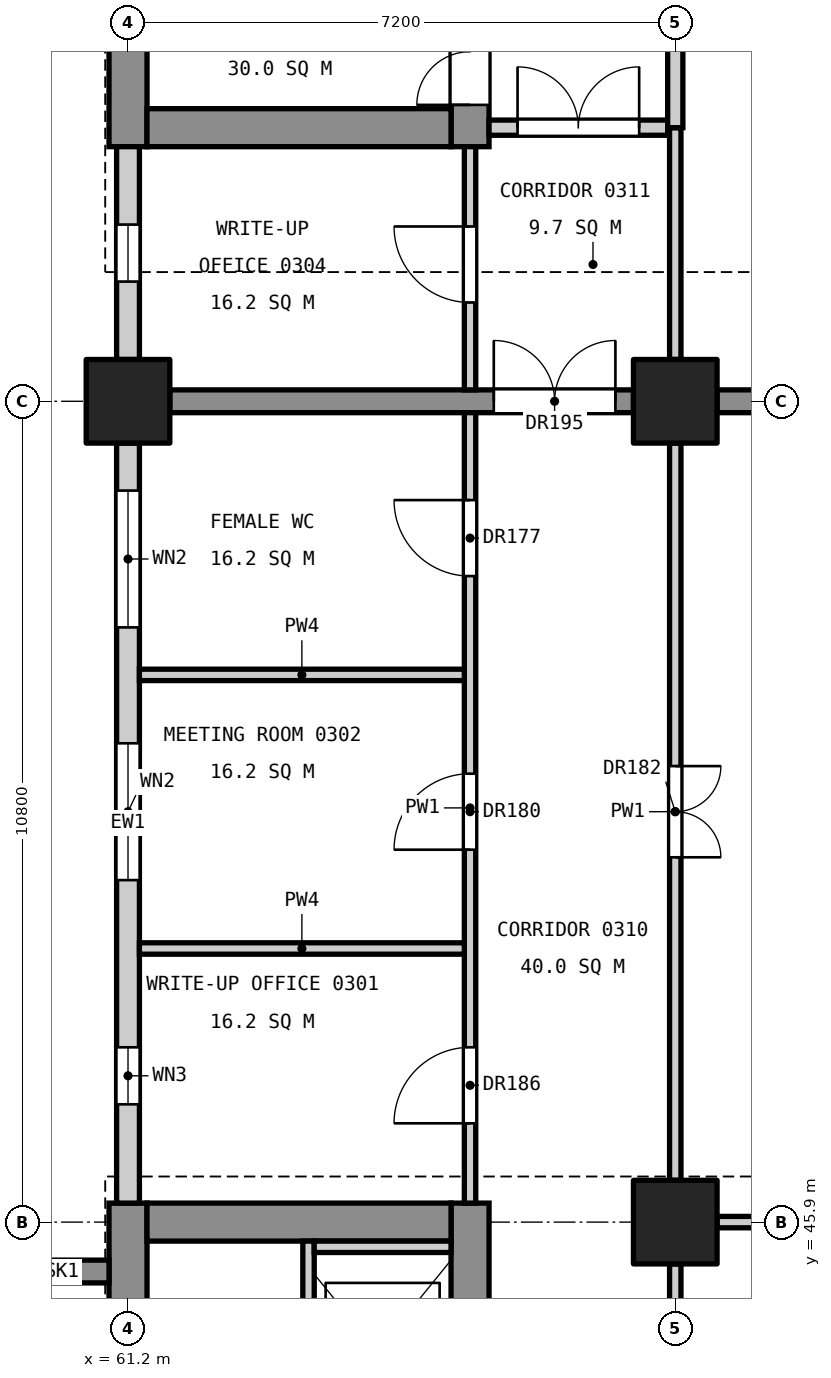
"""IFC4 building model, lengths in metres.
Left out: names, types, materials, properties, quantities, classifications, styles, units other than length and angle.
Written with IfcOpenShell. Run it as: python <this file> out.ifc"""

import sys

from ifc_helpers import new_model, si_unit, direction, frame, frame_2d, origin, origin_2d, place, context, subcontext, project, spatial, rectangle, extrude, element, fill, save


model = new_model("IFC4")
c1 = context("Model", 3, precision=1e-05, world=origin(), true_north=direction((0.0, 1.0)))
c2 = subcontext(c1, "Body", "Model", "MODEL_VIEW")
j1 = project(units=[si_unit("LENGTHUNIT", "METRE"), si_unit("PLANEANGLEUNIT", "RADIAN")], contexts=[c1])
p1 = place(None, origin())
s1 = spatial("IfcSite", under=j1, at=p1, CompositionType="ELEMENT")
p2 = place(p1, origin())
s2 = spatial("IfcBuilding", under=s1, at=p2, CompositionType="ELEMENT")
p3 = place(p2, frame((0.0, 0.0, 16.8)))
s3 = spatial("IfcBuildingStorey", under=s2, at=p3, CompositionType="ELEMENT", Elevation=16.8)
for number, where, z_axis, x_axis in (
    (1, (61.2, 56.7, 0.0), (0.0, 0.0, 1.0), (1.0, 0.0, 0.0)),
    (2, (68.4, 45.9, 0.0), (0.0, 0.0, 1.0), (1.0, 0.0, 0.0)),
    (3, (68.4, 56.7, 0.0), (0.0, 0.0, 1.0), (1.0, 0.0, 0.0)),
):
    element("IfcColumn", number, at=place(p3, frame(where, z_axis=z_axis, x_axis=x_axis)), inside=s3, PredefinedType="COLUMN", context=c2, shape_type="SweptSolid", body=[
        extrude(rectangle(XDim=1.1, YDim=1.1, at=origin_2d()), origin(), (0.0, 0.0, 1.0), 5.4),
    ])
p4 = place(p3, frame((61.2, 34.85, 0.0), z_axis=(0.0, 0.0, 1.0), x_axis=(0.0, 1.0, 0.0)))
e4 = element("IfcWall", 4, at=p4, inside=s3, PredefinedType="SHEAR", context=c2, shape_type="SweptSolid", body=[
    extrude(rectangle(XDim=11.3, YDim=0.5, at=frame_2d((5.65, 0.0))), origin(), (0.0, 0.0, 1.0), 5.15),
])
p5 = place(p4, frame((6.3, 0.0, 3.4)))
e5 = element("IfcOpeningElement", 5, at=p5, cuts=e4, PredefinedType="OPENING", context=c2, shape_type="SweptSolid", body=[
    extrude(rectangle(XDim=1.2, YDim=0.9, at=frame_2d((0.6, 0.45))), frame((0.0, 0.26, 0.0), z_axis=(0.0, -1.0, 0.0), x_axis=(1.0, 0.0, 0.0)), (0.0, 0.0, 1.0), 0.52),
])
p6 = place(p3, frame((65.7, 34.85, 0.0), z_axis=(0.0, 0.0, 1.0), x_axis=(0.0, 1.0, 0.0)))
e6 = element("IfcWall", 6, at=p6, inside=s3, PredefinedType="SHEAR", context=c2, shape_type="SweptSolid", body=[
    extrude(rectangle(XDim=11.3, YDim=0.5, at=frame_2d((5.65, 0.0))), origin(), (0.0, 0.0, 1.0), 5.15),
])
p7 = place(p6, frame((0.55, 0.0, 0.0)))
e7 = element("IfcOpeningElement", 7, at=p7, cuts=e6, PredefinedType="OPENING", context=c2, shape_type="SweptSolid", body=[
    extrude(rectangle(XDim=1.4, YDim=2.1, at=frame_2d((0.7, 1.05))), frame((0.0, 0.26, 0.0), z_axis=(0.0, -1.0, 0.0), x_axis=(1.0, 0.0, 0.0)), (0.0, 0.0, 1.0), 0.52),
])
p8 = place(p6, frame((8.8, 0.0, 0.0)))
e8 = element("IfcOpeningElement", 8, at=p8, cuts=e6, PredefinedType="OPENING", context=c2, shape_type="SweptSolid", body=[
    extrude(rectangle(XDim=1.1, YDim=2.1, at=frame_2d((0.55, 1.05))), frame((0.0, 0.26, 0.0), z_axis=(0.0, -1.0, 0.0), x_axis=(1.0, 0.0, 0.0)), (0.0, 0.0, 1.0), 0.52),
])
p9 = place(p3, frame((61.45, 45.9, 0.0), z_axis=(0.0, 0.0, 1.0), x_axis=(1.0, 0.0, 0.0)))
e9 = element("IfcWall", 9, at=p9, inside=s3, PredefinedType="SHEAR", context=c2, shape_type="SweptSolid", body=[
    extrude(rectangle(XDim=4.0, YDim=0.5, at=frame_2d((2.0, 0.0))), origin(), (0.0, 0.0, 1.0), 5.15),
])
p10 = place(p3, frame((61.2, 60.05, 0.0), z_axis=(0.0, 0.0, 1.0), x_axis=(0.0, 1.0, 0.0)))
e10 = element("IfcWall", 10, at=p10, inside=s3, PredefinedType="SHEAR", context=c2, shape_type="SweptSolid", body=[
    extrude(rectangle(XDim=14.9, YDim=0.5, at=frame_2d((7.45, 0.0))), origin(), (0.0, 0.0, 1.0), 5.15),
])
p11 = place(p10, frame((6.3, 0.0, 3.4)))
e11 = element("IfcOpeningElement", 11, at=p11, cuts=e10, PredefinedType="OPENING", context=c2, shape_type="SweptSolid", body=[
    extrude(rectangle(XDim=1.2, YDim=0.9, at=frame_2d((0.6, 0.45))), frame((0.0, 0.26, 0.0), z_axis=(0.0, -1.0, 0.0), x_axis=(1.0, 0.0, 0.0)), (0.0, 0.0, 1.0), 0.52),
])
p12 = place(p3, frame((65.7, 60.05, 0.0), z_axis=(0.0, 0.0, 1.0), x_axis=(0.0, 1.0, 0.0)))
e12 = element("IfcWall", 12, at=p12, inside=s3, PredefinedType="SHEAR", context=c2, shape_type="SweptSolid", body=[
    extrude(rectangle(XDim=14.9, YDim=0.5, at=frame_2d((7.45, 0.0))), origin(), (0.0, 0.0, 1.0), 5.15),
])
p13 = place(p12, frame((0.55, 0.0, 0.0)))
e13 = element("IfcOpeningElement", 13, at=p13, cuts=e12, PredefinedType="OPENING", context=c2, shape_type="SweptSolid", body=[
    extrude(rectangle(XDim=1.4, YDim=2.1, at=frame_2d((0.7, 1.05))), frame((0.0, 0.26, 0.0), z_axis=(0.0, -1.0, 0.0), x_axis=(1.0, 0.0, 0.0)), (0.0, 0.0, 1.0), 0.52),
])
p14 = place(p12, frame((8.85, 0.0, 0.0)))
e14 = element("IfcOpeningElement", 14, at=p14, cuts=e12, PredefinedType="OPENING", context=c2, shape_type="SweptSolid", body=[
    extrude(rectangle(XDim=1.1, YDim=2.1, at=frame_2d((0.55, 1.05))), frame((0.0, 0.26, 0.0), z_axis=(0.0, -1.0, 0.0), x_axis=(1.0, 0.0, 0.0)), (0.0, 0.0, 1.0), 0.52),
])
p15 = place(p12, frame((11.4, 0.0, 0.0)))
e15 = element("IfcOpeningElement", 15, at=p15, cuts=e12, PredefinedType="OPENING", context=c2, shape_type="SweptSolid", body=[
    extrude(rectangle(XDim=1.1, YDim=2.1, at=frame_2d((0.55, 1.05))), frame((0.0, 0.26, 0.0), z_axis=(0.0, -1.0, 0.0), x_axis=(1.0, 0.0, 0.0)), (0.0, 0.0, 1.0), 0.52),
])
p16 = place(p3, frame((61.45, 60.3, 0.0), z_axis=(0.0, 0.0, 1.0), x_axis=(1.0, 0.0, 0.0)))
e16 = element("IfcWall", 16, at=p16, inside=s3, PredefinedType="SHEAR", context=c2, shape_type="SweptSolid", body=[
    extrude(rectangle(XDim=4.0, YDim=0.5, at=frame_2d((2.0, 0.0))), origin(), (0.0, 0.0, 1.0), 5.15),
])
p17 = place(p3, frame((60.95, 45.25, 0.0), z_axis=(0.0, 0.0, 1.0), x_axis=(-1.0, 0.0, 0.0)))
e17 = element("IfcWall", 17, at=p17, inside=s3, PredefinedType="SHEAR", context=c2, shape_type="SweptSolid", body=[
    extrude(rectangle(XDim=1.25, YDim=0.3, at=frame_2d((0.625, 0.0))), origin(), (0.0, 0.0, 1.0), 5.4),
])
p18 = place(p3, frame((61.75, 56.7, 0.0), z_axis=(0.0, 0.0, 1.0), x_axis=(1.0, 0.0, 0.0)))
e18 = element("IfcWall", 18, at=p18, inside=s3, PredefinedType="SHEAR", context=c2, shape_type="SweptSolid", body=[
    extrude(rectangle(XDim=6.1, YDim=0.3, at=frame_2d((3.05, 0.0))), origin(), (0.0, 0.0, 1.0), 5.15),
])
p19 = place(p18, frame((4.262, 0.0, 0.0)))
e19 = element("IfcOpeningElement", 19, at=p19, cuts=e18, PredefinedType="OPENING", context=c2, shape_type="SweptSolid", body=[
    extrude(rectangle(XDim=1.6, YDim=2.1, at=frame_2d((0.8, 1.05))), frame((0.0, 0.16, 0.0), z_axis=(0.0, -1.0, 0.0), x_axis=(1.0, 0.0, 0.0)), (0.0, 0.0, 1.0), 0.32),
])
p20 = place(p3, frame((68.95, 56.7, 0.0), z_axis=(0.0, 0.0, 1.0), x_axis=(1.0, 0.0, 0.0)))
e20 = element("IfcWall", 20, at=p20, inside=s3, PredefinedType="SHEAR", context=c2, shape_type="SweptSolid", body=[
    extrude(rectangle(XDim=9.7, YDim=0.3, at=frame_2d((4.85, 0.0))), origin(), (0.0, 0.0, 1.0), 5.15),
])
p21 = place(p3, frame((63.575, 43.0, 0.0), z_axis=(0.0, 0.0, 1.0), x_axis=(0.0, 1.0, 0.0)))
e21 = element("IfcWall", 21, at=p21, inside=s3, PredefinedType="SOLIDWALL", context=c2, shape_type="SweptSolid", body=[
    extrude(rectangle(XDim=2.65, YDim=0.15, at=frame_2d((1.325, 0.0))), origin(), (0.0, 0.0, 1.0), 5.4),
])
p22 = place(p3, frame((63.65, 45.575, 0.0), z_axis=(0.0, 0.0, 1.0), x_axis=(1.0, 0.0, 0.0)))
e22 = element("IfcWall", 22, at=p22, inside=s3, PredefinedType="SOLIDWALL", context=c2, shape_type="SweptSolid", body=[
    extrude(rectangle(XDim=1.8, YDim=0.15, at=frame_2d((0.9, 0.0))), origin(), (0.0, 0.0, 1.0), 5.4),
])
p23 = place(p3, frame((61.2, 46.15, 0.0), z_axis=(0.0, 0.0, 1.0), x_axis=(0.0, 1.0, 0.0)))
e23 = element("IfcWall", 23, at=p23, inside=s3, PredefinedType="STANDARD", context=c2, shape_type="SweptSolid", body=[
    extrude(rectangle(XDim=10.0, YDim=0.3, at=frame_2d((5.0, 0.0))), origin(), (0.0, 0.0, 1.0), 4.25),
])
p24 = place(p23, frame((1.3, 0.0, 0.8)))
e24 = element("IfcOpeningElement", 24, at=p24, cuts=e23, PredefinedType="OPENING", context=c2, shape_type="SweptSolid", body=[
    extrude(rectangle(XDim=0.75, YDim=1.2, at=frame_2d((0.375, 0.6))), frame((0.0, 0.16, 0.0), z_axis=(0.0, -1.0, 0.0), x_axis=(1.0, 0.0, 0.0)), (0.0, 0.0, 1.0), 0.32),
])
p25 = place(p23, frame((4.25, 0.0, 0.9)))
e25 = element("IfcOpeningElement", 25, at=p25, cuts=e23, PredefinedType="OPENING", context=c2, shape_type="SweptSolid", body=[
    extrude(rectangle(XDim=1.8, YDim=3.0, at=frame_2d((0.9, 1.5))), frame((0.0, 0.16, 0.0), z_axis=(0.0, -1.0, 0.0), x_axis=(1.0, 0.0, 0.0)), (0.0, 0.0, 1.0), 0.32),
])
p26 = place(p23, frame((7.575, 0.0, 0.9)))
e26 = element("IfcOpeningElement", 26, at=p26, cuts=e23, PredefinedType="OPENING", context=c2, shape_type="SweptSolid", body=[
    extrude(rectangle(XDim=1.8, YDim=3.0, at=frame_2d((0.9, 1.5))), frame((0.0, 0.16, 0.0), z_axis=(0.0, -1.0, 0.0), x_axis=(1.0, 0.0, 0.0)), (0.0, 0.0, 1.0), 0.32),
])
p27 = place(p3, frame((61.2, 57.25, 0.0), z_axis=(0.0, 0.0, 1.0), x_axis=(0.0, 1.0, 0.0)))
e27 = element("IfcWall", 27, at=p27, inside=s3, PredefinedType="STANDARD", context=c2, shape_type="SweptSolid", body=[
    extrude(rectangle(XDim=2.8, YDim=0.3, at=frame_2d((1.4, 0.0))), origin(), (0.0, 0.0, 1.0), 4.25),
])
p28 = place(p27, frame((1.025, 0.0, 0.8)))
e28 = element("IfcOpeningElement", 28, at=p28, cuts=e27, PredefinedType="OPENING", context=c2, shape_type="SweptSolid", body=[
    extrude(rectangle(XDim=0.75, YDim=1.2, at=frame_2d((0.375, 0.6))), frame((0.0, 0.16, 0.0), z_axis=(0.0, -1.0, 0.0), x_axis=(1.0, 0.0, 0.0)), (0.0, 0.0, 1.0), 0.32),
])
p29 = place(p3, frame((65.7, 46.15, 0.0), z_axis=(0.0, 0.0, 1.0), x_axis=(0.0, 1.0, 0.0)))
e29 = element("IfcWall", 29, at=p29, inside=s3, PredefinedType="PARTITIONING", context=c2, shape_type="SweptSolid", body=[
    extrude(rectangle(XDim=10.4, YDim=0.15, at=frame_2d((5.2, 0.0))), origin(), (0.0, 0.0, 1.0), 4.05),
])
p30 = place(p29, frame((8.25, 0.0, 0.0)))
e30 = element("IfcOpeningElement", 30, at=p30, cuts=e29, PredefinedType="OPENING", context=c2, shape_type="SweptSolid", body=[
    extrude(rectangle(XDim=1.0, YDim=2.1, at=frame_2d((0.5, 1.05))), frame((0.0, 0.085, 0.0), z_axis=(0.0, -1.0, 0.0), x_axis=(1.0, 0.0, 0.0)), (0.0, 0.0, 1.0), 0.17),
])
p31 = place(p29, frame((4.65, 0.0, 0.0)))
e31 = element("IfcOpeningElement", 31, at=p31, cuts=e29, PredefinedType="OPENING", context=c2, shape_type="SweptSolid", body=[
    extrude(rectangle(XDim=1.0, YDim=2.1, at=frame_2d((0.5, 1.05))), frame((0.0, 0.085, 0.0), z_axis=(0.0, -1.0, 0.0), x_axis=(1.0, 0.0, 0.0)), (0.0, 0.0, 1.0), 0.17),
])
p32 = place(p29, frame((1.05, 0.0, 0.0)))
e32 = element("IfcOpeningElement", 32, at=p32, cuts=e29, PredefinedType="OPENING", context=c2, shape_type="SweptSolid", body=[
    extrude(rectangle(XDim=1.0, YDim=2.1, at=frame_2d((0.5, 1.05))), frame((0.0, 0.085, 0.0), z_axis=(0.0, -1.0, 0.0), x_axis=(1.0, 0.0, 0.0)), (0.0, 0.0, 1.0), 0.17),
])
p33 = place(p3, frame((65.7, 56.85, 0.0), z_axis=(0.0, 0.0, 1.0), x_axis=(0.0, 1.0, 0.0)))
e33 = element("IfcWall", 33, at=p33, inside=s3, PredefinedType="PARTITIONING", context=c2, shape_type="SweptSolid", body=[
    extrude(rectangle(XDim=3.2, YDim=0.15, at=frame_2d((1.6, 0.0))), origin(), (0.0, 0.0, 1.0), 4.05),
])
p34 = place(p33, frame((1.15, 0.0, 0.0)))
e34 = element("IfcOpeningElement", 34, at=p34, cuts=e33, PredefinedType="OPENING", context=c2, shape_type="SweptSolid", body=[
    extrude(rectangle(XDim=1.0, YDim=2.1, at=frame_2d((0.5, 1.05))), frame((0.0, 0.085, 0.0), z_axis=(0.0, -1.0, 0.0), x_axis=(1.0, 0.0, 0.0)), (0.0, 0.0, 1.0), 0.17),
])
for number, where, z_axis, x_axis in (
    (35, (61.35, 49.5, 0.0), (0.0, 0.0, 1.0), (1.0, 0.0, 0.0)),
    (36, (61.35, 53.1, 0.0), (0.0, 0.0, 1.0), (1.0, 0.0, 0.0)),
):
    element("IfcWall", number, at=place(p3, frame(where, z_axis=z_axis, x_axis=x_axis)), inside=s3, PredefinedType="PARTITIONING", context=c2, shape_type="SweptSolid", body=[
        extrude(rectangle(XDim=4.275, YDim=0.15, at=frame_2d((2.137, 0.0))), origin(), (0.0, 0.0, 1.0), 4.05),
    ])
p35 = place(p3, frame((65.95, 60.3, 0.0), z_axis=(0.0, 0.0, 1.0), x_axis=(1.0, 0.0, 0.0)))
e37 = element("IfcWall", 37, at=p35, inside=s3, PredefinedType="PARTITIONING", context=c2, shape_type="SweptSolid", body=[
    extrude(rectangle(XDim=2.35, YDim=0.2, at=frame_2d((1.175, 0.0))), origin(), (0.0, 0.0, 1.0), 4.05),
])
p36 = place(p35, frame((0.375, 0.0, 0.0)))
e38 = element("IfcOpeningElement", 38, at=p36, cuts=e37, PredefinedType="OPENING", context=c2, shape_type="SweptSolid", body=[
    extrude(rectangle(XDim=1.6, YDim=2.1, at=frame_2d((0.8, 1.05))), frame((0.0, 0.11, 0.0), z_axis=(0.0, -1.0, 0.0), x_axis=(1.0, 0.0, 0.0)), (0.0, 0.0, 1.0), 0.22),
])
p37 = place(p3, frame((68.4, 41.9, 0.0), z_axis=(0.0, 0.0, 1.0), x_axis=(0.0, 1.0, 0.0)))
e39 = element("IfcWall", 39, at=p37, inside=s3, PredefinedType="PARTITIONING", context=c2, shape_type="SweptSolid", body=[
    extrude(rectangle(XDim=3.45, YDim=0.15, at=frame_2d((1.725, 0.0))), origin(), (0.0, 0.0, 1.0), 4.15),
])
p38 = place(p37, frame((1.125, 0.0, 0.0)))
e40 = element("IfcOpeningElement", 40, at=p38, cuts=e39, PredefinedType="OPENING", context=c2, shape_type="SweptSolid", body=[
    extrude(rectangle(XDim=1.2, YDim=2.1, at=frame_2d((0.6, 1.05))), frame((0.0, 0.085, 0.0), z_axis=(0.0, -1.0, 0.0), x_axis=(1.0, 0.0, 0.0)), (0.0, 0.0, 1.0), 0.17),
])
p39 = place(p3, frame((68.4, 46.45, 0.0), z_axis=(0.0, 0.0, 1.0), x_axis=(0.0, 1.0, 0.0)))
e41 = element("IfcWall", 41, at=p39, inside=s3, PredefinedType="PARTITIONING", context=c2, shape_type="SweptSolid", body=[
    extrude(rectangle(XDim=9.7, YDim=0.15, at=frame_2d((4.85, 0.0))), origin(), (0.0, 0.0, 1.0), 4.15),
])
p40 = place(p39, frame((4.25, 0.0, 0.0)))
e42 = element("IfcOpeningElement", 42, at=p40, cuts=e41, PredefinedType="OPENING", context=c2, shape_type="SweptSolid", body=[
    extrude(rectangle(XDim=1.2, YDim=2.1, at=frame_2d((0.6, 1.05))), frame((0.0, 0.085, 0.0), z_axis=(0.0, -1.0, 0.0), x_axis=(1.0, 0.0, 0.0)), (0.0, 0.0, 1.0), 0.17),
])
p41 = place(p3, frame((68.4, 57.25, 0.0), z_axis=(0.0, 0.0, 1.0), x_axis=(0.0, 1.0, 0.0)))
e43 = element("IfcWall", 43, at=p41, inside=s3, PredefinedType="PARTITIONING", context=c2, shape_type="SweptSolid", body=[
    extrude(rectangle(XDim=3.05, YDim=0.15, at=frame_2d((1.525, 0.0))), origin(), (0.0, 0.0, 1.0), 4.15),
])
p42 = place(p3, frame((68.4, 60.3, 0.0), z_axis=(0.0, 0.0, 1.0), x_axis=(0.0, 1.0, 0.0)))
e44 = element("IfcWall", 44, at=p42, inside=s3, PredefinedType="PARTITIONING", context=c2, shape_type="SweptSolid", body=[
    extrude(rectangle(XDim=4.2, YDim=0.2, at=frame_2d((2.1, 0.0))), origin(), (0.0, 0.0, 1.0), 4.15),
])
p43 = place(p3, frame((68.95, 45.9, 0.0), z_axis=(0.0, 0.0, 1.0), x_axis=(1.0, 0.0, 0.0)))
e45 = element("IfcWall", 45, at=p43, inside=s3, PredefinedType="PARTITIONING", context=c2, shape_type="SweptSolid", body=[
    extrude(rectangle(XDim=9.7, YDim=0.15, at=frame_2d((4.85, 0.0))), origin(), (0.0, 0.0, 1.0), 4.05),
])
p44 = place(p13, origin())
e46 = element("IfcDoor", 46, at=p44, inside=s3, OperationType="DOUBLE_DOOR_SINGLE_SWING", PredefinedType="DOOR", context=c2, shape_type="SweptSolid", body=[
    extrude(rectangle(XDim=1.4, YDim=2.1, at=frame_2d((0.7, 1.05))), frame((0.0, 0.025, 0.0), z_axis=(0.0, -1.0, 0.0), x_axis=(1.0, 0.0, 0.0)), (0.0, 0.0, 1.0), 0.05),
])
fill(e13, e46)
p45 = place(p24, origin())
e47 = element("IfcWindow", 47, at=p45, inside=s3, PartitioningType="SINGLE_PANEL", PredefinedType="WINDOW", context=c2, shape_type="SweptSolid", body=[
    extrude(rectangle(XDim=0.75, YDim=1.2, at=frame_2d((0.375, 0.6))), frame((0.0, 0.03, 0.0), z_axis=(0.0, -1.0, 0.0), x_axis=(1.0, 0.0, 0.0)), (0.0, 0.0, 1.0), 0.06),
])
fill(e24, e47)
p46 = place(p25, origin())
e48 = element("IfcWindow", 48, at=p46, inside=s3, PartitioningType="SINGLE_PANEL", PredefinedType="WINDOW", context=c2, shape_type="SweptSolid", body=[
    extrude(rectangle(XDim=1.8, YDim=3.0, at=frame_2d((0.9, 1.5))), frame((0.0, 0.03, 0.0), z_axis=(0.0, -1.0, 0.0), x_axis=(1.0, 0.0, 0.0)), (0.0, 0.0, 1.0), 0.06),
])
fill(e25, e48)
p47 = place(p26, origin())
e49 = element("IfcWindow", 49, at=p47, inside=s3, PartitioningType="SINGLE_PANEL", PredefinedType="WINDOW", context=c2, shape_type="SweptSolid", body=[
    extrude(rectangle(XDim=1.8, YDim=3.0, at=frame_2d((0.9, 1.5))), frame((0.0, 0.03, 0.0), z_axis=(0.0, -1.0, 0.0), x_axis=(1.0, 0.0, 0.0)), (0.0, 0.0, 1.0), 0.06),
])
fill(e26, e49)
p48 = place(p28, origin())
e50 = element("IfcWindow", 50, at=p48, inside=s3, PartitioningType="SINGLE_PANEL", PredefinedType="WINDOW", context=c2, shape_type="SweptSolid", body=[
    extrude(rectangle(XDim=0.75, YDim=1.2, at=frame_2d((0.375, 0.6))), frame((0.0, 0.03, 0.0), z_axis=(0.0, -1.0, 0.0), x_axis=(1.0, 0.0, 0.0)), (0.0, 0.0, 1.0), 0.06),
])
fill(e28, e50)
p49 = place(p30, origin())
e51 = element("IfcDoor", 51, at=p49, inside=s3, OperationType="SINGLE_SWING_RIGHT", PredefinedType="DOOR", context=c2, shape_type="SweptSolid", body=[
    extrude(rectangle(XDim=1.0, YDim=2.1, at=frame_2d((0.5, 1.05))), frame((0.0, 0.025, 0.0), z_axis=(0.0, -1.0, 0.0), x_axis=(1.0, 0.0, 0.0)), (0.0, 0.0, 1.0), 0.05),
])
fill(e30, e51)
p50 = place(p31, origin())
e52 = element("IfcDoor", 52, at=p50, inside=s3, OperationType="SINGLE_SWING_LEFT", PredefinedType="DOOR", context=c2, shape_type="SweptSolid", body=[
    extrude(rectangle(XDim=1.0, YDim=2.1, at=frame_2d((0.5, 1.05))), frame((0.0, 0.025, 0.0), z_axis=(0.0, -1.0, 0.0), x_axis=(1.0, 0.0, 0.0)), (0.0, 0.0, 1.0), 0.05),
])
fill(e31, e52)
p51 = place(p40, frame((1.2, 0.0, 0.0), z_axis=(0.0, 0.0, 1.0), x_axis=(-1.0, 0.0, 0.0)))
e53 = element("IfcDoor", 53, at=p51, inside=s3, OperationType="DOUBLE_DOOR_SINGLE_SWING", PredefinedType="DOOR", context=c2, shape_type="SweptSolid", body=[
    extrude(rectangle(XDim=1.2, YDim=2.1, at=frame_2d((0.6, 1.05))), frame((0.0, 0.025, 0.0), z_axis=(0.0, -1.0, 0.0), x_axis=(1.0, 0.0, 0.0)), (0.0, 0.0, 1.0), 0.05),
])
fill(e42, e53)
p52 = place(p32, origin())
e54 = element("IfcDoor", 54, at=p52, inside=s3, OperationType="SINGLE_SWING_LEFT", PredefinedType="DOOR", context=c2, shape_type="SweptSolid", body=[
    extrude(rectangle(XDim=1.0, YDim=2.1, at=frame_2d((0.5, 1.05))), frame((0.0, 0.025, 0.0), z_axis=(0.0, -1.0, 0.0), x_axis=(1.0, 0.0, 0.0)), (0.0, 0.0, 1.0), 0.05),
])
fill(e32, e54)
p53 = place(p34, origin())
e55 = element("IfcDoor", 55, at=p53, inside=s3, OperationType="SINGLE_SWING_RIGHT", PredefinedType="DOOR", context=c2, shape_type="SweptSolid", body=[
    extrude(rectangle(XDim=1.0, YDim=2.1, at=frame_2d((0.5, 1.05))), frame((0.0, 0.025, 0.0), z_axis=(0.0, -1.0, 0.0), x_axis=(1.0, 0.0, 0.0)), (0.0, 0.0, 1.0), 0.05),
])
fill(e34, e55)
p54 = place(p36, origin())
e56 = element("IfcDoor", 56, at=p54, inside=s3, OperationType="DOUBLE_DOOR_SINGLE_SWING", PredefinedType="DOOR", context=c2, shape_type="SweptSolid", body=[
    extrude(rectangle(XDim=1.6, YDim=2.1, at=frame_2d((0.8, 1.05))), frame((0.0, 0.025, 0.0), z_axis=(0.0, -1.0, 0.0), x_axis=(1.0, 0.0, 0.0)), (0.0, 0.0, 1.0), 0.05),
])
fill(e38, e56)
p55 = place(p19, origin())
e57 = element("IfcDoor", 57, at=p55, inside=s3, OperationType="DOUBLE_DOOR_SINGLE_SWING", PredefinedType="DOOR", context=c2, shape_type="SweptSolid", body=[
    extrude(rectangle(XDim=1.6, YDim=2.1, at=frame_2d((0.8, 1.05))), frame((0.0, 0.025, 0.0), z_axis=(0.0, -1.0, 0.0), x_axis=(1.0, 0.0, 0.0)), (0.0, 0.0, 1.0), 0.05),
])
fill(e19, e57)
save(model, sys.argv[1])
